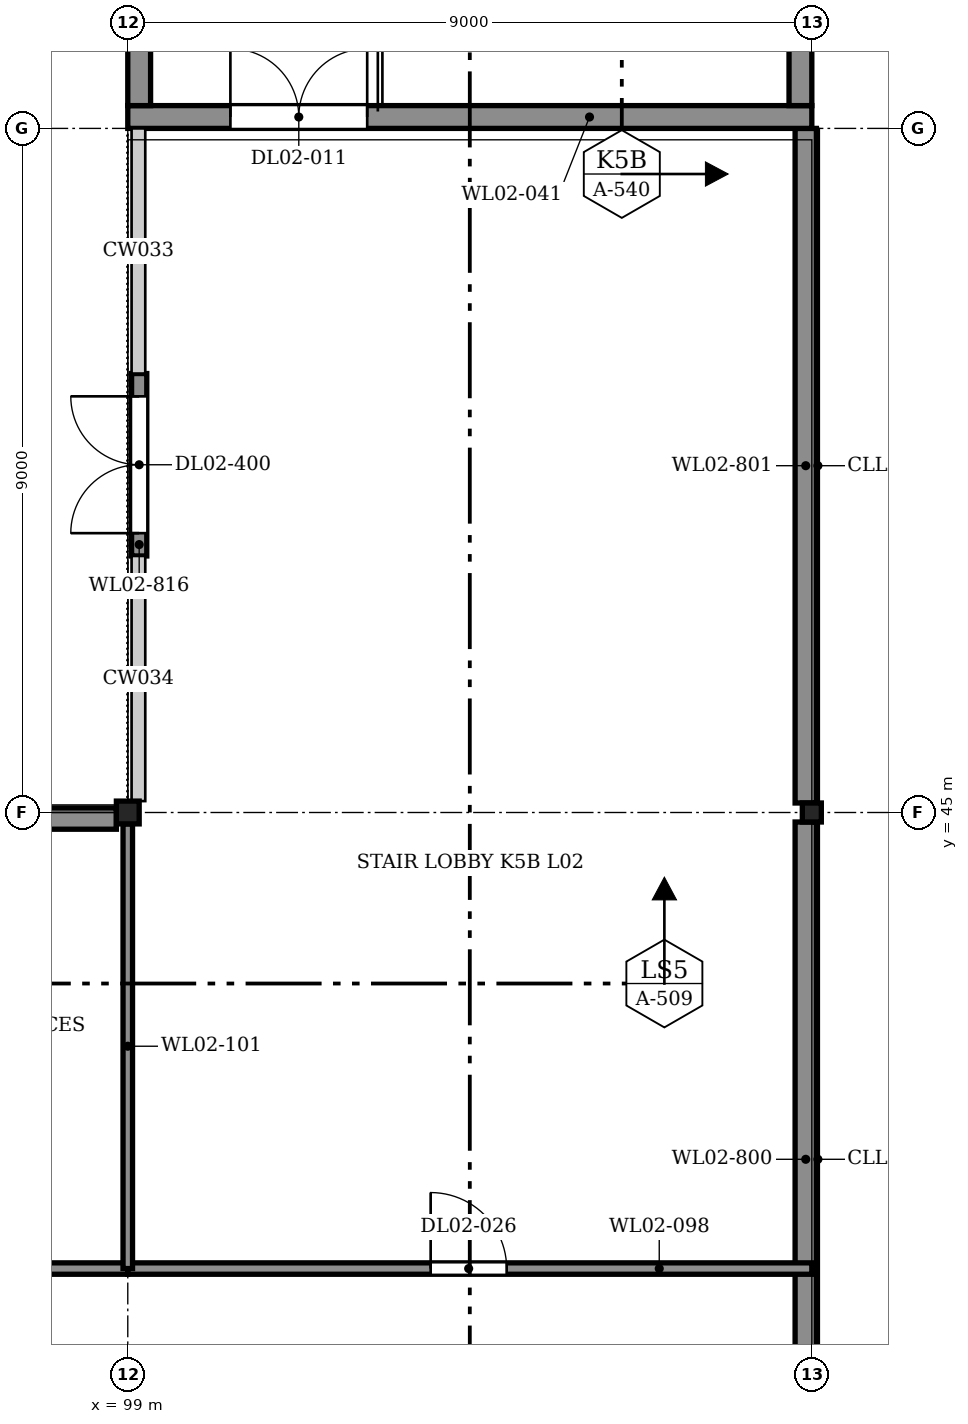
"""IFC4 building model, lengths in metres.
Left out: names, types, materials, properties, quantities, classifications, styles, units other than length and angle.
Written with IfcOpenShell. Run it as: python <this file> out.ifc"""

import sys

from ifc_helpers import new_model, si_unit, direction, frame, frame_2d, origin, origin_2d, place, context, subcontext, project, spatial, rectangle, hollow_rectangle, extrude, element, fill, save


model = new_model("IFC4")
c1 = context("Model", 3, precision=1e-05, world=origin(), true_north=direction((0.0, 1.0)))
c2 = subcontext(c1, "Body", "Model", "MODEL_VIEW")
j1 = project(units=[si_unit("LENGTHUNIT", "METRE"), si_unit("PLANEANGLEUNIT", "RADIAN")], contexts=[c1])
p1 = place(None, origin())
s1 = spatial("IfcSite", under=j1, at=p1, CompositionType="ELEMENT")
p2 = place(p1, origin())
s2 = spatial("IfcBuilding", under=s1, at=p2, CompositionType="ELEMENT")
p3 = place(p2, frame((0.0, 0.0, 9.2)))
s3 = spatial("IfcBuildingStorey", under=s2, at=p3, CompositionType="ELEMENT", Elevation=9.2)
p4 = place(p3, frame((99.0, 45.0, 0.0), z_axis=(0.0, 0.0, 1.0), x_axis=(1.0, 0.0, 0.0)))
e1 = element("IfcColumn", 1, at=p4, inside=s3, PredefinedType="COLUMN", context=c2, shape_type="SweptSolid", body=[
    extrude(hollow_rectangle(XDim=0.3, YDim=0.3, WallThickness=0.01, InnerFilletRadius=0.015, OuterFilletRadius=0.025, at=origin_2d()), origin(), (0.0, 0.0, 1.0), 3.7),
])
p5 = place(p3, frame((108.0, 45.0, 0.0), z_axis=(0.0, 0.0, 1.0), x_axis=(1.0, 0.0, 0.0)))
e2 = element("IfcColumn", 2, at=p5, inside=s3, PredefinedType="COLUMN", context=c2, shape_type="SweptSolid", body=[
    extrude(hollow_rectangle(XDim=0.25, YDim=0.25, WallThickness=0.01, InnerFilletRadius=0.015, OuterFilletRadius=0.025, at=origin_2d()), origin(), (0.0, 0.0, 1.0), 3.7),
])
for number, where, z_axis, x_axis in (
    (3, (107.92, 36.0, 0.0), (0.0, 0.0, 1.0), (0.0, 1.0, 0.0)),
    (4, (107.92, 45.125, 0.0), (0.0, 0.0, 1.0), (0.0, 1.0, 0.0)),
):
    element("IfcWall", number, at=place(p3, frame(where, z_axis=z_axis, x_axis=x_axis)), inside=s3, PredefinedType="SOLIDWALL", context=c2, shape_type="SweptSolid", body=[
        extrude(rectangle(XDim=8.875, YDim=0.28, at=frame_2d((4.438, 0.0))), origin(), (0.0, 0.0, 1.0), 2.75),
    ])
p6 = place(p3, frame((90.125, 44.92, 0.0), z_axis=(0.0, 0.0, 1.0), x_axis=(1.0, 0.0, 0.0)))
e5 = element("IfcWall", 5, at=p6, inside=s3, PredefinedType="SOLIDWALL", context=c2, shape_type="SweptSolid", body=[
    extrude(rectangle(XDim=8.725, YDim=0.28, at=frame_2d((4.363, 0.0))), origin(), (0.0, 0.0, 1.0), 2.75),
])
p7 = place(p3, frame((99.15, 48.375, 0.0), z_axis=(0.0, 0.0, 1.0), x_axis=(0.0, 1.0, 0.0)))
e6 = element("IfcWall", 6, at=p7, inside=s3, PredefinedType="SOLIDWALL", context=c2, shape_type="SweptSolid", body=[
    extrude(rectangle(XDim=2.4, YDim=0.2, at=frame_2d((1.2, 0.0))), origin(), (0.0, 0.0, 1.0), 3.45),
])
p8 = place(p7, frame((0.3, 0.0, 0.0)))
e7 = element("IfcOpeningElement", 7, at=p8, cuts=e6, PredefinedType="OPENING", context=c2, shape_type="SweptSolid", body=[
    extrude(rectangle(XDim=1.8, YDim=2.4, at=frame_2d((0.9, 1.2))), frame((0.0, 0.11, 0.0), z_axis=(0.0, -1.0, 0.0), x_axis=(1.0, 0.0, 0.0)), (0.0, 0.0, 1.0), 0.22),
])
p9 = place(p3, frame((81.3, 44.875, 3.7), z_axis=(0.0, 0.0, 1.0), x_axis=(1.0, 0.0, 0.0)))
e8 = element("IfcWall", 8, at=p9, inside=s3, PredefinedType="PARAPET", context=c2, shape_type="SweptSolid", body=[
    extrude(rectangle(XDim=17.7, YDim=0.25, at=frame_2d((8.85, 0.0))), origin(), (0.0, 0.0, 1.0), 1.6),
])
for number, where, z_axis, x_axis in (
    (9, (99.125, 45.125, 3.7), (0.0, 0.0, 1.0), (0.0, 1.0, 0.0)),
    (10, (107.875, 45.125, 3.7), (0.0, 0.0, 1.0), (0.0, 1.0, 0.0)),
    (11, (107.875, 36.3, 3.7), (0.0, 0.0, 1.0), (0.0, 1.0, 0.0)),
):
    element("IfcWall", number, at=place(p3, frame(where, z_axis=z_axis, x_axis=x_axis)), inside=s3, PredefinedType="PARAPET", context=c2, shape_type="SweptSolid", body=[
        extrude(rectangle(XDim=8.575, YDim=0.25, at=frame_2d((4.288, 0.0))), origin(), (0.0, 0.0, 1.0), 1.6),
    ])
p10 = place(p3, frame((99.0, 54.15, 0.0), z_axis=(0.0, 0.0, 1.0), x_axis=(1.0, 0.0, 0.0)))
e12 = element("IfcWall", 12, at=p10, inside=s3, PredefinedType="SOLIDWALL", context=c2, shape_type="SweptSolid", body=[
    extrude(rectangle(XDim=9.0, YDim=0.3, at=frame_2d((4.5, 0.0))), origin(), (0.0, 0.0, 1.0), 4.2),
])
p11 = place(p10, frame((1.35, 0.0, 0.0)))
e13 = element("IfcOpeningElement", 13, at=p11, cuts=e12, PredefinedType="OPENING", context=c2, shape_type="SweptSolid", body=[
    extrude(rectangle(XDim=1.8, YDim=2.1, at=frame_2d((0.9, 1.05))), frame((0.0, 0.16, 0.0), z_axis=(0.0, -1.0, 0.0), x_axis=(1.0, 0.0, 0.0)), (0.0, 0.0, 1.0), 0.32),
])
for number, where, z_axis, x_axis in (
    (14, (107.85, 54.3, 0.0), (0.0, 0.0, 1.0), (0.0, 1.0, 0.0)),
    (15, (99.15, 54.3, 0.0), (0.0, 0.0, 1.0), (0.0, 1.0, 0.0)),
):
    element("IfcWall", number, at=place(p3, frame(where, z_axis=z_axis, x_axis=x_axis)), inside=s3, PredefinedType="SOLIDWALL", context=c2, shape_type="SweptSolid", body=[
        extrude(rectangle(XDim=8.4, YDim=0.3, at=frame_2d((4.2, 0.0))), origin(), (0.0, 0.0, 1.0), 4.2),
    ])
p12 = place(p3, frame((90.0, 39.0, 0.0), z_axis=(0.0, 0.0, 1.0), x_axis=(1.0, 0.0, 0.0)))
e16 = element("IfcWall", 16, at=p12, inside=s3, PredefinedType="PARTITIONING", context=c2, shape_type="SweptSolid", body=[
    extrude(rectangle(XDim=9.0, YDim=0.15, at=frame_2d((4.5, 0.0))), origin(), (0.0, 0.0, 1.0), 2.658),
])
p13 = place(p12, frame((3.985, 0.0, 0.0)))
e17 = element("IfcOpeningElement", 17, at=p13, cuts=e16, PredefinedType="OPENING", context=c2, shape_type="SweptSolid", body=[
    extrude(rectangle(XDim=1.0, YDim=2.1, at=frame_2d((0.5, 1.05))), frame((0.0, 0.085, 0.0), z_axis=(0.0, -1.0, 0.0), x_axis=(1.0, 0.0, 0.0)), (0.0, 0.0, 1.0), 0.17),
])
p14 = place(p3, frame((99.0, 39.0, 0.0), z_axis=(0.0, 0.0, 1.0), x_axis=(1.0, 0.0, 0.0)))
e18 = element("IfcWall", 18, at=p14, inside=s3, PredefinedType="PARTITIONING", context=c2, shape_type="SweptSolid", body=[
    extrude(rectangle(XDim=9.0, YDim=0.15, at=frame_2d((4.5, 0.0))), origin(), (0.0, 0.0, 1.0), 2.658),
])
p15 = place(p14, frame((3.985, 0.0, 0.0)))
e19 = element("IfcOpeningElement", 19, at=p15, cuts=e18, PredefinedType="OPENING", context=c2, shape_type="SweptSolid", body=[
    extrude(rectangle(XDim=1.0, YDim=2.1, at=frame_2d((0.5, 1.05))), frame((0.0, 0.085, 0.0), z_axis=(0.0, -1.0, 0.0), x_axis=(1.0, 0.0, 0.0)), (0.0, 0.0, 1.0), 0.17),
])
p16 = place(p3, frame((99.0, 39.0, 0.0), z_axis=(0.0, 0.0, 1.0), x_axis=(0.0, 1.0, 0.0)))
e20 = element("IfcWall", 20, at=p16, inside=s3, PredefinedType="PARTITIONING", context=c2, shape_type="SweptSolid", body=[
    extrude(rectangle(XDim=5.85, YDim=0.125, at=frame_2d((2.925, 0.0))), origin(), (0.0, 0.0, 1.0), 2.658),
])
p17 = place(p8, origin())
e21 = element("IfcDoor", 21, at=p17, inside=s3, OperationType="DOUBLE_DOOR_SINGLE_SWING", PredefinedType="DOOR", context=c2, shape_type="SweptSolid", body=[
    extrude(rectangle(XDim=1.8, YDim=2.4, at=frame_2d((0.9, 1.2))), frame((0.0, 0.025, 0.0), z_axis=(0.0, -1.0, 0.0), x_axis=(1.0, 0.0, 0.0)), (0.0, 0.0, 1.0), 0.05),
])
fill(e7, e21)
p18 = place(p11, origin())
e22 = element("IfcDoor", 22, at=p18, inside=s3, OperationType="DOUBLE_DOOR_SINGLE_SWING", PredefinedType="DOOR", context=c2, shape_type="SweptSolid", body=[
    extrude(rectangle(XDim=1.8, YDim=2.1, at=frame_2d((0.9, 1.05))), frame((0.0, 0.025, 0.0), z_axis=(0.0, -1.0, 0.0), x_axis=(1.0, 0.0, 0.0)), (0.0, 0.0, 1.0), 0.05),
])
fill(e13, e22)
p19 = place(p15, origin())
e23 = element("IfcDoor", 23, at=p19, inside=s3, OperationType="SINGLE_SWING_RIGHT", PredefinedType="DOOR", context=c2, shape_type="SweptSolid", body=[
    extrude(rectangle(XDim=1.0, YDim=2.1, at=frame_2d((0.5, 1.05))), frame((0.0, 0.025, 0.0), z_axis=(0.0, -1.0, 0.0), x_axis=(1.0, 0.0, 0.0)), (0.0, 0.0, 1.0), 0.05),
])
fill(e19, e23)
save(model, sys.argv[1])
